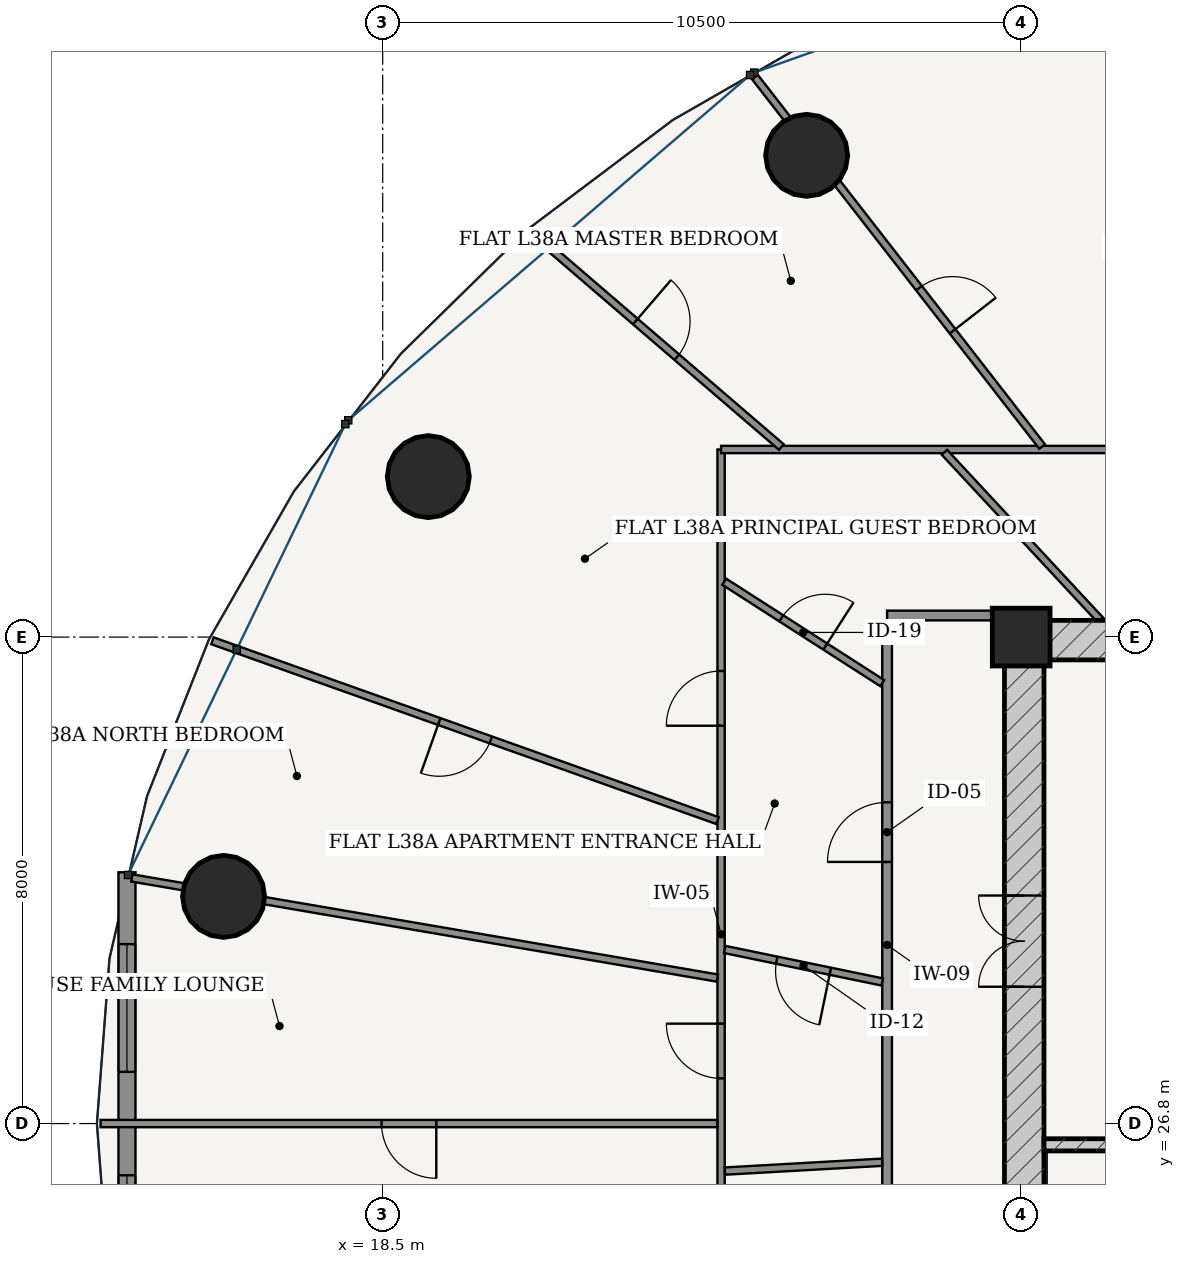
"""IFC4 building model, lengths in metres.
Left out: names, types, materials, properties, quantities, classifications, styles, units other than length and angle.
Written with IfcOpenShell. Run it as: python <this file> out.ifc"""

import sys

from ifc_helpers import new_model, si_unit, direction, frame, frame_2d, origin, origin_2d, place, context, subcontext, project, spatial, rectangle, hollow_circle, extrude, source, transform, mapped, element, fill, save


model = new_model("IFC4")
c1 = context("Model", 3, precision=1e-05, world=origin(), true_north=direction((-0.2419218956, 0.970295726276)))
c2 = subcontext(c1, "Body", "Model", "MODEL_VIEW")
j1 = project(units=[si_unit("LENGTHUNIT", "METRE"), si_unit("PLANEANGLEUNIT", "RADIAN")], contexts=[c1])
p1 = place(None, origin())
s1 = spatial("IfcSite", under=j1, at=p1, CompositionType="ELEMENT")
p2 = place(p1, origin())
s2 = spatial("IfcBuilding", under=s1, at=p2, CompositionType="ELEMENT")
p3 = place(p2, frame((0.0, 0.0, 146.2)))
s3 = spatial("IfcBuildingStorey", under=s2, at=p3, CompositionType="ELEMENT", Elevation=146.2)
p4 = place(p3, frame((29.0, 34.8, 0.0), z_axis=(0.0, 0.0, 1.0), x_axis=(1.0, 0.0, 0.0)))
e1 = element("IfcColumn", 1, at=p4, inside=s3, PredefinedType="COLUMN", context=c2, shape_type="SweptSolid", body=[
    extrude(rectangle(XDim=0.95, YDim=0.95, at=origin_2d()), origin(), (0.0, 0.0, 1.0), 3.6),
])
p5 = place(p3, frame((28.725, 34.75, 0.0), z_axis=(0.0, 0.0, 1.0), x_axis=(1.0, 0.0, 0.0)))
e2 = element("IfcWall", 2, at=p5, inside=s3, PredefinedType="SHEAR", context=c2, shape_type="SweptSolid", body=[
    extrude(rectangle(XDim=18.55, YDim=0.65, at=frame_2d((9.275, 0.0))), origin(), (0.0, 0.0, 1.0), 3.33),
])
p6 = place(p3, frame((29.05, 19.175, 0.0), z_axis=(0.0, 0.0, 1.0), x_axis=(0.0, 1.0, 0.0)))
e3 = element("IfcWall", 3, at=p6, inside=s3, PredefinedType="SHEAR", context=c2, shape_type="SweptSolid", body=[
    extrude(rectangle(XDim=15.25, YDim=0.65, at=frame_2d((7.625, 0.0))), origin(), (0.0, 0.0, 1.0), 3.33),
])
p7 = place(p6, frame((9.875, 0.0, 0.0)))
e4 = element("IfcOpeningElement", 4, at=p7, cuts=e3, PredefinedType="OPENING", context=c2, shape_type="SweptSolid", body=[
    extrude(rectangle(XDim=1.5, YDim=2.2, at=frame_2d((0.75, 1.1))), frame((0.0, 0.335, 0.0), z_axis=(0.0, -1.0, 0.0), x_axis=(1.0, 0.0, 0.0)), (0.0, 0.0, 1.0), 0.67),
])
p8 = place(p3, frame((29.375, 26.45, 0.0), z_axis=(0.0, 0.0, 1.0), x_axis=(1.0, 0.0, 0.0)))
e5 = element("IfcWall", 5, at=p8, inside=s3, PredefinedType="SOLIDWALL", context=c2, shape_type="SweptSolid", body=[
    extrude(rectangle(XDim=3.32, YDim=0.2, at=frame_2d((1.66, 0.0))), origin(), (0.0, 0.0, 1.0), 3.33),
])
p9 = place(p8, frame((1.185, 0.0, 0.0)))
e6 = element("IfcOpeningElement", 6, at=p9, cuts=e5, PredefinedType="OPENING", context=c2, shape_type="SweptSolid", body=[
    extrude(rectangle(XDim=0.95, YDim=2.15, at=frame_2d((0.475, 1.075))), frame((0.0, 0.11, 0.0), z_axis=(0.0, -1.0, 0.0), x_axis=(1.0, 0.0, 0.0)), (0.0, 0.0, 1.0), 0.22),
])
for number, where, z_axis, x_axis in (
    (7, (25.472, 42.723, 0.0), (0.0, 0.0, 1.0), (1.0, 0.0, 0.0)),
    (8, (19.25, 37.439, 0.0), (0.0, 0.0, 1.0), (1.0, 0.0, 0.0)),
    (9, (15.883, 30.536, 0.0), (0.0, 0.0, 1.0), (1.0, 0.0, 0.0)),
):
    element("IfcColumn", number, at=place(p3, frame(where, z_axis=z_axis, x_axis=x_axis)), inside=s3, PredefinedType="COLUMN", context=c2, shape_type="SweptSolid", body=[
        extrude(hollow_circle(Radius=0.675, WallThickness=0.042, at=origin_2d()), origin(), (0.0, 0.0, 1.0), 3.6),
    ])
p10 = place(p3, frame((14.294, 30.932, 0.0), z_axis=(0.0, 0.0, 1.0), x_axis=(0.0, -1.0, 0.0)))
e10 = element("IfcWall", 10, at=p10, inside=s3, PredefinedType="SOLIDWALL", context=c2, shape_type="SweptSolid", body=[
    extrude(rectangle(XDim=8.264, YDim=0.28, at=frame_2d((4.132, 0.0))), origin(), (0.0, 0.0, 1.0), 3.33),
])
p11 = place(p10, frame((1.181, 0.0, 0.85)))
e11 = element("IfcOpeningElement", 11, at=p11, cuts=e10, PredefinedType="OPENING", context=c2, shape_type="SweptSolid", body=[
    extrude(rectangle(XDim=2.1, YDim=1.95, at=frame_2d((1.05, 0.975))), frame((0.0, 0.15, 0.0), z_axis=(0.0, -1.0, 0.0), x_axis=(1.0, 0.0, 0.0)), (0.0, 0.0, 1.0), 0.3),
])
p12 = place(p10, frame((4.983, 0.0, 0.85)))
e12 = element("IfcOpeningElement", 12, at=p12, cuts=e10, PredefinedType="OPENING", context=c2, shape_type="SweptSolid", body=[
    extrude(rectangle(XDim=2.1, YDim=1.95, at=frame_2d((1.05, 0.975))), frame((0.0, 0.15, 0.0), z_axis=(0.0, -1.0, 0.0), x_axis=(1.0, 0.0, 0.0)), (0.0, 0.0, 1.0), 0.3),
])
p13 = place(p3, frame((26.795, 24.4, 0.0), z_axis=(0.0, 0.0, 1.0), x_axis=(0.0, 1.0, 0.0)))
e13 = element("IfcWall", 13, at=p13, inside=s3, PredefinedType="PARTITIONING", context=c2, shape_type="SweptSolid", body=[
    extrude(rectangle(XDim=10.675, YDim=0.16, at=frame_2d((5.337, 0.0))), origin(), (0.0, 0.0, 1.0), 2.776),
])
p14 = place(p13, frame((6.702, 0.0, 0.0)))
e14 = element("IfcOpeningElement", 14, at=p14, cuts=e13, PredefinedType="OPENING", context=c2, shape_type="SweptSolid", body=[
    extrude(rectangle(XDim=0.98, YDim=2.2, at=frame_2d((0.49, 1.1))), frame((0.0, 0.09, 0.0), z_axis=(0.0, -1.0, 0.0), x_axis=(1.0, 0.0, 0.0)), (0.0, 0.0, 1.0), 0.18),
])
p15 = place(p3, frame((26.795, 35.155, 0.0), z_axis=(0.0, 0.0, 1.0), x_axis=(1.0, 0.0, 0.0)))
e15 = element("IfcWall", 15, at=p15, inside=s3, PredefinedType="PARTITIONING", context=c2, shape_type="SweptSolid", body=[
    extrude(rectangle(XDim=1.93, YDim=0.16, at=frame_2d((0.965, 0.0))), origin(), (0.0, 0.0, 1.0), 2.776),
])
p16 = place(p3, frame((24.065, 21.941, 0.0), z_axis=(0.0, 0.0, 1.0), x_axis=(0.0, 1.0, 0.0)))
e16 = element("IfcWall", 16, at=p16, inside=s3, PredefinedType="PARTITIONING", context=c2, shape_type="SweptSolid", body=[
    extrude(rectangle(XDim=15.944, YDim=0.12, at=frame_2d((7.972, 0.0))), origin(), (0.0, 0.0, 1.0), 2.776),
])
p17 = place(p16, frame((5.602, 0.0, 0.0)))
e17 = element("IfcOpeningElement", 17, at=p17, cuts=e16, PredefinedType="OPENING", context=c2, shape_type="SweptSolid", body=[
    extrude(rectangle(XDim=0.9, YDim=2.15, at=frame_2d((0.45, 1.075))), frame((0.0, 0.07, 0.0), z_axis=(0.0, -1.0, 0.0), x_axis=(1.0, 0.0, 0.0)), (0.0, 0.0, 1.0), 0.14),
])
p18 = place(p16, frame((1.707, 0.0, 0.0)))
e18 = element("IfcOpeningElement", 18, at=p18, cuts=e16, PredefinedType="OPENING", context=c2, shape_type="SweptSolid", body=[
    extrude(rectangle(XDim=0.9, YDim=2.15, at=frame_2d((0.45, 1.075))), frame((0.0, 0.07, 0.0), z_axis=(0.0, -1.0, 0.0), x_axis=(1.0, 0.0, 0.0)), (0.0, 0.0, 1.0), 0.14),
])
p19 = place(p16, frame((11.402, 0.0, 0.0)))
e19 = element("IfcOpeningElement", 19, at=p19, cuts=e16, PredefinedType="OPENING", context=c2, shape_type="SweptSolid", body=[
    extrude(rectangle(XDim=0.9, YDim=2.15, at=frame_2d((0.45, 1.075))), frame((0.0, 0.07, 0.0), z_axis=(0.0, -1.0, 0.0), x_axis=(1.0, 0.0, 0.0)), (0.0, 0.0, 1.0), 0.14),
])
p20 = place(p3, frame((24.065, 37.885, 0.0), z_axis=(0.0, 0.0, 1.0), x_axis=(1.0, 0.0, 0.0)))
e20 = element("IfcWall", 20, at=p20, inside=s3, PredefinedType="PARTITIONING", context=c2, shape_type="SweptSolid", body=[
    extrude(rectangle(XDim=7.47, YDim=0.12, at=frame_2d((3.735, 0.0))), origin(), (0.0, 0.0, 1.0), 2.776),
])
p21 = place(p3, frame((29.344, 37.934, 0.0), z_axis=(0.0, 0.0, 1.0), x_axis=(-0.613758289074, 0.789493991487, 0.0)))
e21 = element("IfcWall", 21, at=p21, inside=s3, PredefinedType="PARTITIONING", context=c2, shape_type="SweptSolid", body=[
    extrude(rectangle(XDim=7.695, YDim=0.12, at=frame_2d((3.848, 0.0))), origin(), (0.0, 0.0, 1.0), 2.776),
])
p22 = place(p21, frame((2.399, 0.0, 0.0)))
e22 = element("IfcOpeningElement", 22, at=p22, cuts=e21, PredefinedType="OPENING", context=c2, shape_type="SweptSolid", body=[
    extrude(rectangle(XDim=0.9, YDim=2.15, at=frame_2d((0.45, 1.075))), frame((0.0, 0.07, 0.0), z_axis=(0.0, -1.0, 0.0), x_axis=(1.0, 0.0, 0.0)), (0.0, 0.0, 1.0), 0.14),
])
p23 = place(p3, frame((25.056, 37.925, 0.0), z_axis=(0.0, 0.0, 1.0), x_axis=(-0.758354915574, 0.65184186888, 0.0)))
e23 = element("IfcWall", 23, at=p23, inside=s3, PredefinedType="PARTITIONING", context=c2, shape_type="SweptSolid", body=[
    extrude(rectangle(XDim=5.432, YDim=0.12, at=frame_2d((2.716, 0.0))), origin(), (0.0, 0.0, 1.0), 2.846),
])
p24 = place(p23, frame((2.266, 0.0, 0.0)))
e24 = element("IfcOpeningElement", 24, at=p24, cuts=e23, PredefinedType="OPENING", context=c2, shape_type="SweptSolid", body=[
    extrude(rectangle(XDim=0.9, YDim=2.15, at=frame_2d((0.45, 1.075))), frame((0.0, 0.07, 0.0), z_axis=(0.0, -1.0, 0.0), x_axis=(1.0, 0.0, 0.0)), (0.0, 0.0, 1.0), 0.14),
])
p25 = place(p3, frame((24.007, 31.782, 0.0), z_axis=(0.0, 0.0, 1.0), x_axis=(-0.942077868165, 0.335394231187, 0.0)))
e25 = element("IfcWall", 25, at=p25, inside=s3, PredefinedType="PARTITIONING", context=c2, shape_type="SweptSolid", body=[
    extrude(rectangle(XDim=8.817, YDim=0.12, at=frame_2d((4.408, 0.0))), origin(), (0.0, 0.0, 1.0), 2.846),
])
p26 = place(p25, frame((3.958, 0.0, 0.0)))
e26 = element("IfcOpeningElement", 26, at=p26, cuts=e25, PredefinedType="OPENING", context=c2, shape_type="SweptSolid", body=[
    extrude(rectangle(XDim=0.9, YDim=2.15, at=frame_2d((0.45, 1.075))), frame((0.0, 0.07, 0.0), z_axis=(0.0, -1.0, 0.0), x_axis=(1.0, 0.0, 0.0)), (0.0, 0.0, 1.0), 0.14),
])
p27 = place(p3, frame((24.004, 29.193, 0.0), z_axis=(0.0, 0.0, 1.0), x_axis=(-0.985698378271, 0.168519159369, 0.0)))
e27 = element("IfcWall", 27, at=p27, inside=s3, PredefinedType="PARTITIONING", context=c2, shape_type="SweptSolid", body=[
    extrude(rectangle(XDim=9.769, YDim=0.12, at=frame_2d((4.884, 0.0))), origin(), (0.0, 0.0, 1.0), 2.776),
])
p28 = place(p3, frame((24.003, 26.8, 0.0), z_axis=(0.0, 0.0, 1.0), x_axis=(-1.0, 0.0, 0.0)))
e28 = element("IfcWall", 28, at=p28, inside=s3, PredefinedType="PARTITIONING", context=c2, shape_type="SweptSolid", body=[
    extrude(rectangle(XDim=10.143, YDim=0.12, at=frame_2d((5.071, 0.0))), origin(), (0.0, 0.0, 1.0), 2.846),
])
p29 = place(p28, frame((4.622, 0.0, 0.0)))
e29 = element("IfcOpeningElement", 29, at=p29, cuts=e28, PredefinedType="OPENING", context=c2, shape_type="SweptSolid", body=[
    extrude(rectangle(XDim=0.9, YDim=2.15, at=frame_2d((0.45, 1.075))), frame((0.0, 0.07, 0.0), z_axis=(0.0, -1.0, 0.0), x_axis=(1.0, 0.0, 0.0)), (0.0, 0.0, 1.0), 0.14),
])
p30 = place(p3, frame((30.307, 35.075, 0.0), z_axis=(0.0, 0.0, 1.0), x_axis=(-0.68082810609, 0.732443233267, 0.0)))
e30 = element("IfcWall", 30, at=p30, inside=s3, PredefinedType="PARTITIONING", context=c2, shape_type="SweptSolid", body=[
    extrude(rectangle(XDim=3.775, YDim=0.12, at=frame_2d((1.887, 0.0))), origin(), (0.0, 0.0, 1.0), 2.776),
])
p31 = place(p3, frame((26.715, 34.043, 0.0), z_axis=(0.0, 0.0, 1.0), x_axis=(-0.841597086151, 0.540105864235, 0.0)))
e31 = element("IfcWall", 31, at=p31, inside=s3, PredefinedType="PARTITIONING", context=c2, shape_type="SweptSolid", body=[
    extrude(rectangle(XDim=3.087, YDim=0.12, at=frame_2d((1.543, 0.0))), origin(), (0.0, 0.0, 1.0), 3.005),
])
p32 = place(p31, frame((1.113, 0.0, 0.0)))
e32 = element("IfcOpeningElement", 32, at=p32, cuts=e31, PredefinedType="OPENING", context=c2, shape_type="SweptSolid", body=[
    extrude(rectangle(XDim=0.86, YDim=2.15, at=frame_2d((0.43, 1.075))), frame((0.0, 0.07, 0.0), z_axis=(0.0, -1.0, 0.0), x_axis=(1.0, 0.0, 0.0)), (0.0, 0.0, 1.0), 0.14),
])
p33 = place(p3, frame((26.715, 29.129, 0.0), z_axis=(0.0, 0.0, 1.0), x_axis=(-0.979376501526, 0.202043728582, 0.0)))
e33 = element("IfcWall", 33, at=p33, inside=s3, PredefinedType="PARTITIONING", context=c2, shape_type="SweptSolid", body=[
    extrude(rectangle(XDim=2.644, YDim=0.12, at=frame_2d((1.322, 0.0))), origin(), (0.0, 0.0, 1.0), 3.33),
])
p34 = place(p33, frame((0.872, 0.0, 0.0)))
e34 = element("IfcOpeningElement", 34, at=p34, cuts=e33, PredefinedType="OPENING", context=c2, shape_type="SweptSolid", body=[
    extrude(rectangle(XDim=0.9, YDim=2.15, at=frame_2d((0.45, 1.075))), frame((0.0, 0.07, 0.0), z_axis=(0.0, -1.0, 0.0), x_axis=(1.0, 0.0, 0.0)), (0.0, 0.0, 1.0), 0.14),
])
p35 = place(p3, frame((26.715, 26.164, 0.0), z_axis=(0.0, 0.0, 1.0), x_axis=(-0.998418047295, -0.056226353574, 0.0)))
e35 = element("IfcWall", 35, at=p35, inside=s3, PredefinedType="PARTITIONING", context=c2, shape_type="SweptSolid", body=[
    extrude(rectangle(XDim=2.592, YDim=0.12, at=frame_2d((1.296, 0.0))), origin(), (0.0, 0.0, 1.0), 3.33),
])
m1 = source(origin(), c2, "Body", "SweptSolid", [
    extrude(rectangle(XDim=2.1, YDim=1.95, at=frame_2d((1.05, 0.975))), frame((0.0, 0.03, 0.0), z_axis=(0.0, -1.0, 0.0), x_axis=(1.0, 0.0, 0.0)), (0.0, 0.0, 1.0), 0.06),
])
p36 = place(p11, origin())
e36 = element("IfcWindow", 36, at=p36, inside=s3, PartitioningType="SINGLE_PANEL", PredefinedType="WINDOW", context=c2, shape_type="MappedRepresentation", body=[
    mapped(m1, transform((0.0, 0.0, 0.0), scale=1.0)),
])
fill(e11, e36)
p37 = place(p12, origin())
e37 = element("IfcWindow", 37, at=p37, inside=s3, PartitioningType="SINGLE_PANEL", PredefinedType="WINDOW", context=c2, shape_type="MappedRepresentation", body=[
    mapped(m1, transform((0.0, 0.0, 0.0), scale=1.0)),
])
fill(e12, e37)
m2 = source(origin(), c2, "Body", "SweptSolid", [
    extrude(rectangle(XDim=1.5, YDim=2.2, at=frame_2d((0.75, 1.1))), frame((0.0, 0.025, 0.0), z_axis=(0.0, -1.0, 0.0), x_axis=(1.0, 0.0, 0.0)), (0.0, 0.0, 1.0), 0.05),
])
p38 = place(p7, origin())
e38 = element("IfcDoor", 38, at=p38, inside=s3, OperationType="DOUBLE_DOOR_SINGLE_SWING", PredefinedType="DOOR", context=c2, shape_type="MappedRepresentation", body=[
    mapped(m2, transform((0.0, 0.0, 0.0), scale=1.0)),
])
fill(e4, e38)
m3 = source(origin(), c2, "Body", "SweptSolid", [
    extrude(rectangle(XDim=0.98, YDim=2.2, at=frame_2d((0.49, 1.1))), frame((0.0, 0.025, 0.0), z_axis=(0.0, -1.0, 0.0), x_axis=(1.0, 0.0, 0.0)), (0.0, 0.0, 1.0), 0.05),
])
p39 = place(p14, origin())
e39 = element("IfcDoor", 39, at=p39, inside=s3, OperationType="SINGLE_SWING_LEFT", PredefinedType="DOOR", context=c2, shape_type="MappedRepresentation", body=[
    mapped(m3, transform((0.0, 0.0, 0.0), scale=1.0)),
])
fill(e14, e39)
m4 = source(origin(), c2, "Body", "SweptSolid", [
    extrude(rectangle(XDim=0.86, YDim=2.15, at=frame_2d((0.43, 1.075))), frame((0.0, 0.025, 0.0), z_axis=(0.0, -1.0, 0.0), x_axis=(1.0, 0.0, 0.0)), (0.0, 0.0, 1.0), 0.05),
])
p40 = place(p32, frame((0.86, 0.0, 0.0), z_axis=(0.0, 0.0, 1.0), x_axis=(-1.0, 0.0, 0.0)))
e40 = element("IfcDoor", 40, at=p40, inside=s3, OperationType="SINGLE_SWING_RIGHT", PredefinedType="DOOR", context=c2, shape_type="MappedRepresentation", body=[
    mapped(m4, transform((0.0, 0.0, 0.0), scale=1.0)),
])
fill(e32, e40)
m5 = source(origin(), c2, "Body", "SweptSolid", [
    extrude(rectangle(XDim=0.9, YDim=2.15, at=frame_2d((0.45, 1.075))), frame((0.0, 0.025, 0.0), z_axis=(0.0, -1.0, 0.0), x_axis=(1.0, 0.0, 0.0)), (0.0, 0.0, 1.0), 0.05),
])
p41 = place(p34, origin())
e41 = element("IfcDoor", 41, at=p41, inside=s3, OperationType="SINGLE_SWING_LEFT", PredefinedType="DOOR", context=c2, shape_type="MappedRepresentation", body=[
    mapped(m5, transform((0.0, 0.0, 0.0), scale=1.0)),
])
fill(e34, e41)
p42 = place(p17, origin())
e42 = element("IfcDoor", 42, at=p42, inside=s3, OperationType="SINGLE_SWING_RIGHT", PredefinedType="DOOR", context=c2, shape_type="MappedRepresentation", body=[
    mapped(m5, transform((0.0, 0.0, 0.0), scale=1.0)),
])
fill(e17, e42)
p43 = place(p29, origin())
e43 = element("IfcDoor", 43, at=p43, inside=s3, OperationType="SINGLE_SWING_LEFT", PredefinedType="DOOR", context=c2, shape_type="MappedRepresentation", body=[
    mapped(m5, transform((0.0, 0.0, 0.0), scale=1.0)),
])
fill(e29, e43)
p44 = place(p19, origin())
e44 = element("IfcDoor", 44, at=p44, inside=s3, OperationType="SINGLE_SWING_LEFT", PredefinedType="DOOR", context=c2, shape_type="MappedRepresentation", body=[
    mapped(m5, transform((0.0, 0.0, 0.0), scale=1.0)),
])
fill(e19, e44)
p45 = place(p26, origin())
e45 = element("IfcDoor", 45, at=p45, inside=s3, OperationType="SINGLE_SWING_RIGHT", PredefinedType="DOOR", context=c2, shape_type="MappedRepresentation", body=[
    mapped(m5, transform((0.0, 0.0, 0.0), scale=1.0)),
])
fill(e26, e45)
p46 = place(p24, frame((0.9, 0.0, 0.0), z_axis=(0.0, 0.0, 1.0), x_axis=(-1.0, 0.0, 0.0)))
e46 = element("IfcDoor", 46, at=p46, inside=s3, OperationType="SINGLE_SWING_LEFT", PredefinedType="DOOR", context=c2, shape_type="MappedRepresentation", body=[
    mapped(m5, transform((0.0, 0.0, 0.0), scale=1.0)),
])
fill(e24, e46)
p47 = place(p22, frame((0.9, 0.0, 0.0), z_axis=(0.0, 0.0, 1.0), x_axis=(-1.0, 0.0, 0.0)))
e47 = element("IfcDoor", 47, at=p47, inside=s3, OperationType="SINGLE_SWING_RIGHT", PredefinedType="DOOR", context=c2, shape_type="MappedRepresentation", body=[
    mapped(m5, transform((0.0, 0.0, 0.0), scale=1.0)),
])
fill(e22, e47)
save(model, sys.argv[1])
